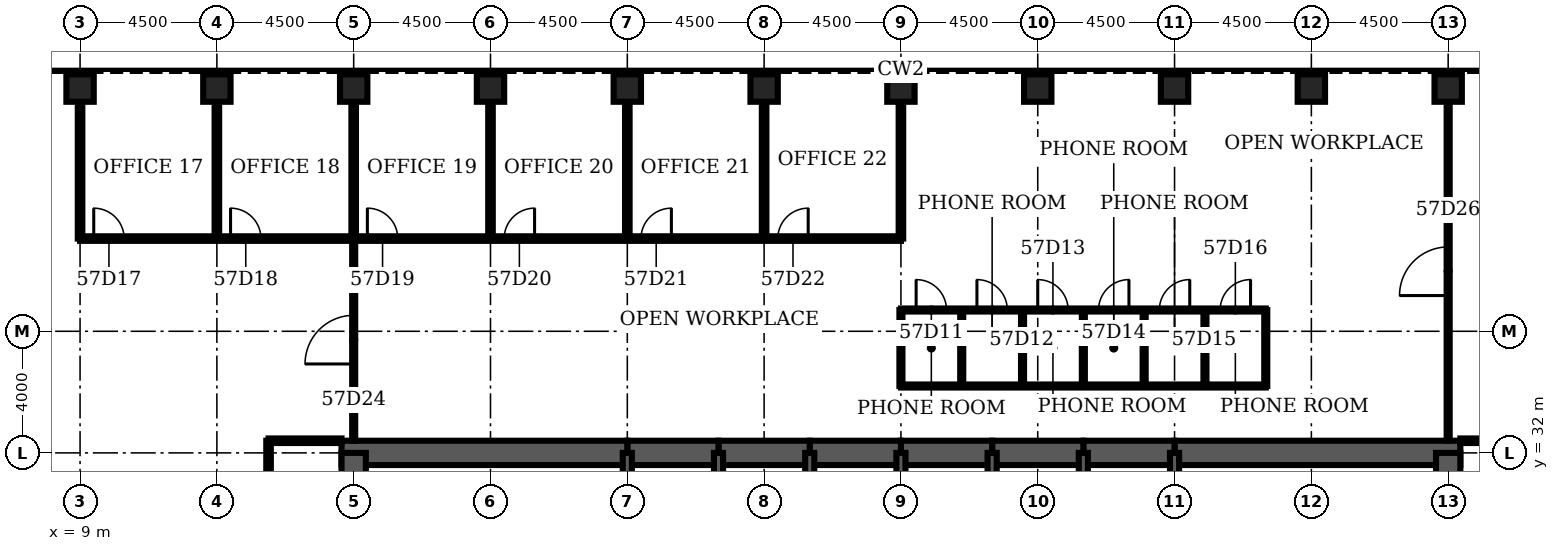
"""IFC4 building model, lengths in metres.
Left out: names, types, materials, properties, quantities, classifications, styles, units other than length and angle.
Written with IfcOpenShell. Run it as: python <this file> out.ifc"""

import sys

from ifc_helpers import new_model, si_unit, direction, frame, frame_2d, origin, origin_2d, place, context, subcontext, project, spatial, rectangle, hollow_rectangle, extrude, element, fill, save


model = new_model("IFC4")
c1 = context("Model", 3, precision=1e-05, world=origin(), true_north=direction((0.0, 1.0)))
c2 = subcontext(c1, "Body", "Model", "MODEL_VIEW")
j1 = project(units=[si_unit("LENGTHUNIT", "METRE"), si_unit("PLANEANGLEUNIT", "RADIAN")], contexts=[c1])
p1 = place(None, origin())
s1 = spatial("IfcSite", under=j1, at=p1, CompositionType="ELEMENT")
p2 = place(p1, origin())
s2 = spatial("IfcBuilding", under=s1, at=p2, CompositionType="ELEMENT")
p3 = place(p2, frame((0.0, 0.0, 253.0)))
s3 = spatial("IfcBuildingStorey", under=s2, at=p3, CompositionType="ELEMENT", Elevation=253.0)
for number, where, z_axis, x_axis in (
    (1, (54.0, 44.0, 0.0), (0.0, 0.0, 1.0), (0.0, 1.0, 0.0)),
    (2, (49.5, 44.0, 0.0), (0.0, 0.0, 1.0), (0.0, 1.0, 0.0)),
    (3, (45.0, 44.0, 0.0), (0.0, 0.0, 1.0), (0.0, 1.0, 0.0)),
    (4, (40.5, 44.0, 0.0), (0.0, 0.0, 1.0), (0.0, 1.0, 0.0)),
    (5, (36.0, 44.0, 0.0), (0.0, 0.0, 1.0), (0.0, 1.0, 0.0)),
    (6, (31.5, 44.0, 0.0), (0.0, 0.0, 1.0), (0.0, 1.0, 0.0)),
    (7, (27.0, 44.0, 0.0), (0.0, 0.0, 1.0), (0.0, 1.0, 0.0)),
    (8, (22.5, 44.0, 0.0), (0.0, 0.0, 1.0), (0.0, 1.0, 0.0)),
    (9, (18.0, 44.0, 0.0), (0.0, 0.0, 1.0), (0.0, 1.0, 0.0)),
    (10, (13.5, 44.0, 0.0), (0.0, 0.0, 1.0), (0.0, 1.0, 0.0)),
    (11, (9.0, 44.0, 0.0), (0.0, 0.0, 1.0), (0.0, 1.0, 0.0)),
):
    element("IfcColumn", number, at=place(p3, frame(where, z_axis=z_axis, x_axis=x_axis)), inside=s3, PredefinedType="COLUMN", context=c2, shape_type="SweptSolid", body=[
        extrude(hollow_rectangle(XDim=0.9, YDim=0.9, WallThickness=0.07, at=origin_2d()), origin(), (0.0, 0.0, 1.0), 4.2),
    ])
p4 = place(p3, frame((54.4, 32.0, 0.0), z_axis=(0.0, 0.0, 1.0), x_axis=(-1.0, 0.0, 0.0)))
e12 = element("IfcWall", 12, at=p4, inside=s3, PredefinedType="SHEAR", context=c2, shape_type="SweptSolid", body=[
    extrude(rectangle(XDim=9.4, YDim=0.8, at=frame_2d((4.7, 0.0))), origin(), (0.0, 0.0, 1.0), 4.2),
])
for number, where, z_axis, x_axis in (
    (13, (45.0, 32.0, 0.0), (0.0, 0.0, 1.0), (-1.0, 0.0, 0.0)),
    (14, (42.0, 32.0, 0.0), (0.0, 0.0, 1.0), (-1.0, 0.0, 0.0)),
    (15, (39.0, 32.0, 0.0), (0.0, 0.0, 1.0), (-1.0, 0.0, 0.0)),
    (16, (36.0, 32.0, 0.0), (0.0, 0.0, 1.0), (-1.0, 0.0, 0.0)),
    (17, (33.0, 32.0, 0.0), (0.0, 0.0, 1.0), (-1.0, 0.0, 0.0)),
    (18, (30.0, 32.0, 0.0), (0.0, 0.0, 1.0), (-1.0, 0.0, 0.0)),
):
    element("IfcWall", number, at=place(p3, frame(where, z_axis=z_axis, x_axis=x_axis)), inside=s3, PredefinedType="SHEAR", context=c2, shape_type="SweptSolid", body=[
        extrude(rectangle(XDim=3.0, YDim=0.8, at=frame_2d((1.5, 0.0))), origin(), (0.0, 0.0, 1.0), 4.2),
    ])
p5 = place(p3, frame((27.0, 32.0, 0.0), z_axis=(0.0, 0.0, 1.0), x_axis=(-1.0, 0.0, 0.0)))
e19 = element("IfcWall", 19, at=p5, inside=s3, PredefinedType="SHEAR", context=c2, shape_type="SweptSolid", body=[
    extrude(rectangle(XDim=9.4, YDim=0.8, at=frame_2d((4.7, 0.0))), origin(), (0.0, 0.0, 1.0), 4.2),
])
for number, where, z_axis, x_axis in (
    (20, (18.0, 32.0, 0.0), (0.0, 0.0, 1.0), (0.0, -1.0, 0.0)),
    (21, (54.0, 28.8, 0.0), (0.0, 0.0, 1.0), (0.0, 1.0, 0.0)),
):
    element("IfcWall", number, at=place(p3, frame(where, z_axis=z_axis, x_axis=x_axis)), inside=s3, PredefinedType="SHEAR", context=c2, shape_type="SweptSolid", body=[
        extrude(rectangle(XDim=3.2, YDim=0.8, at=frame_2d((1.6, 0.0))), origin(), (0.0, 0.0, 1.0), 4.2),
    ])
for number, where, z_axis, x_axis in (
    (22, (27.0, 28.8, 0.0), (0.0, 0.0, 1.0), (0.0, 1.0, 0.0)),
    (23, (30.0, 28.8, 0.0), (0.0, 0.0, 1.0), (0.0, 1.0, 0.0)),
    (24, (33.0, 28.8, 0.0), (0.0, 0.0, 1.0), (0.0, 1.0, 0.0)),
    (25, (36.0, 28.8, 0.0), (0.0, 0.0, 1.0), (0.0, 1.0, 0.0)),
    (26, (39.0, 28.8, 0.0), (0.0, 0.0, 1.0), (0.0, 1.0, 0.0)),
    (27, (42.0, 28.8, 0.0), (0.0, 0.0, 1.0), (0.0, 1.0, 0.0)),
    (28, (45.0, 28.8, 0.0), (0.0, 0.0, 1.0), (0.0, 1.0, 0.0)),
):
    element("IfcWall", number, at=place(p3, frame(where, z_axis=z_axis, x_axis=x_axis)), inside=s3, PredefinedType="SOLIDWALL", context=c2, shape_type="SweptSolid", body=[
        extrude(rectangle(XDim=3.2, YDim=0.3, at=frame_2d((1.6, 0.0))), origin(), (0.0, 0.0, 1.0), 4.2),
    ])
for number, where, z_axis, x_axis in (
    (29, (15.2, 32.4, 0.0), (0.0, 0.0, 1.0), (1.0, 0.0, 0.0)),
    (30, (54.4, 32.4, 0.0), (0.0, 0.0, 1.0), (1.0, 0.0, 0.0)),
):
    element("IfcWall", number, at=place(p3, frame(where, z_axis=z_axis, x_axis=x_axis)), inside=s3, PredefinedType="PARTITIONING", context=c2, shape_type="SweptSolid", body=[
        extrude(rectangle(XDim=2.4, YDim=0.15, at=frame_2d((1.2, 0.0))), origin(), (0.0, 0.0, 1.0), 3.0),
    ])
p6 = place(p3, frame((36.0, 34.2, 0.0), z_axis=(0.0, 0.0, 1.0), x_axis=(1.0, 0.0, 0.0)))
e31 = element("IfcWall", 31, at=p6, inside=s3, PredefinedType="PARTITIONING", context=c2, shape_type="SweptSolid", body=[
    extrude(rectangle(XDim=12.0, YDim=0.1, at=frame_2d((6.0, 0.0))), origin(), (0.0, 0.0, 1.0), 3.0),
])
p7 = place(p3, frame((36.0, 36.7, 0.0), z_axis=(0.0, 0.0, 1.0), x_axis=(1.0, 0.0, 0.0)))
e32 = element("IfcWall", 32, at=p7, inside=s3, PredefinedType="PARTITIONING", context=c2, shape_type="SweptSolid", body=[
    extrude(rectangle(XDim=12.0, YDim=0.1, at=frame_2d((6.0, 0.0))), origin(), (0.0, 0.0, 1.0), 3.0),
])
p8 = place(p7, frame((0.5, 0.0, 0.0)))
e33 = element("IfcOpeningElement", 33, at=p8, cuts=e32, PredefinedType="OPENING", context=c2, shape_type="SweptSolid", body=[
    extrude(rectangle(XDim=1.0, YDim=2.1, at=frame_2d((0.5, 1.05))), frame((0.0, 0.06, 0.0), z_axis=(0.0, -1.0, 0.0), x_axis=(1.0, 0.0, 0.0)), (0.0, 0.0, 1.0), 0.12),
])
p9 = place(p7, frame((2.5, 0.0, 0.0)))
e34 = element("IfcOpeningElement", 34, at=p9, cuts=e32, PredefinedType="OPENING", context=c2, shape_type="SweptSolid", body=[
    extrude(rectangle(XDim=1.0, YDim=2.1, at=frame_2d((0.5, 1.05))), frame((0.0, 0.06, 0.0), z_axis=(0.0, -1.0, 0.0), x_axis=(1.0, 0.0, 0.0)), (0.0, 0.0, 1.0), 0.12),
])
p10 = place(p7, frame((4.5, 0.0, 0.0)))
e35 = element("IfcOpeningElement", 35, at=p10, cuts=e32, PredefinedType="OPENING", context=c2, shape_type="SweptSolid", body=[
    extrude(rectangle(XDim=1.0, YDim=2.1, at=frame_2d((0.5, 1.05))), frame((0.0, 0.06, 0.0), z_axis=(0.0, -1.0, 0.0), x_axis=(1.0, 0.0, 0.0)), (0.0, 0.0, 1.0), 0.12),
])
p11 = place(p7, frame((6.5, 0.0, 0.0)))
e36 = element("IfcOpeningElement", 36, at=p11, cuts=e32, PredefinedType="OPENING", context=c2, shape_type="SweptSolid", body=[
    extrude(rectangle(XDim=1.0, YDim=2.1, at=frame_2d((0.5, 1.05))), frame((0.0, 0.06, 0.0), z_axis=(0.0, -1.0, 0.0), x_axis=(1.0, 0.0, 0.0)), (0.0, 0.0, 1.0), 0.12),
])
p12 = place(p7, frame((8.5, 0.0, 0.0)))
e37 = element("IfcOpeningElement", 37, at=p12, cuts=e32, PredefinedType="OPENING", context=c2, shape_type="SweptSolid", body=[
    extrude(rectangle(XDim=1.0, YDim=2.1, at=frame_2d((0.5, 1.05))), frame((0.0, 0.06, 0.0), z_axis=(0.0, -1.0, 0.0), x_axis=(1.0, 0.0, 0.0)), (0.0, 0.0, 1.0), 0.12),
])
p13 = place(p7, frame((10.5, 0.0, 0.0)))
e38 = element("IfcOpeningElement", 38, at=p13, cuts=e32, PredefinedType="OPENING", context=c2, shape_type="SweptSolid", body=[
    extrude(rectangle(XDim=1.0, YDim=2.1, at=frame_2d((0.5, 1.05))), frame((0.0, 0.06, 0.0), z_axis=(0.0, -1.0, 0.0), x_axis=(1.0, 0.0, 0.0)), (0.0, 0.0, 1.0), 0.12),
])
p14 = place(p3, frame((9.0, 39.05, 0.0), z_axis=(0.0, 0.0, 1.0), x_axis=(1.0, 0.0, 0.0)))
e39 = element("IfcWall", 39, at=p14, inside=s3, PredefinedType="PARTITIONING", context=c2, shape_type="SweptSolid", body=[
    extrude(rectangle(XDim=27.0, YDim=0.15, at=frame_2d((13.5, 0.0))), origin(), (0.0, 0.0, 1.0), 3.0),
])
p15 = place(p14, frame((0.45, 0.0, 0.0)))
e40 = element("IfcOpeningElement", 40, at=p15, cuts=e39, PredefinedType="OPENING", context=c2, shape_type="SweptSolid", body=[
    extrude(rectangle(XDim=1.0, YDim=2.1, at=frame_2d((0.5, 1.05))), frame((0.0, 0.085, 0.0), z_axis=(0.0, -1.0, 0.0), x_axis=(1.0, 0.0, 0.0)), (0.0, 0.0, 1.0), 0.17),
])
p16 = place(p14, frame((4.95, 0.0, 0.0)))
e41 = element("IfcOpeningElement", 41, at=p16, cuts=e39, PredefinedType="OPENING", context=c2, shape_type="SweptSolid", body=[
    extrude(rectangle(XDim=1.0, YDim=2.1, at=frame_2d((0.5, 1.05))), frame((0.0, 0.085, 0.0), z_axis=(0.0, -1.0, 0.0), x_axis=(1.0, 0.0, 0.0)), (0.0, 0.0, 1.0), 0.17),
])
p17 = place(p14, frame((9.45, 0.0, 0.0)))
e42 = element("IfcOpeningElement", 42, at=p17, cuts=e39, PredefinedType="OPENING", context=c2, shape_type="SweptSolid", body=[
    extrude(rectangle(XDim=1.0, YDim=2.1, at=frame_2d((0.5, 1.05))), frame((0.0, 0.085, 0.0), z_axis=(0.0, -1.0, 0.0), x_axis=(1.0, 0.0, 0.0)), (0.0, 0.0, 1.0), 0.17),
])
p18 = place(p14, frame((13.95, 0.0, 0.0)))
e43 = element("IfcOpeningElement", 43, at=p18, cuts=e39, PredefinedType="OPENING", context=c2, shape_type="SweptSolid", body=[
    extrude(rectangle(XDim=1.0, YDim=2.1, at=frame_2d((0.5, 1.05))), frame((0.0, 0.085, 0.0), z_axis=(0.0, -1.0, 0.0), x_axis=(1.0, 0.0, 0.0)), (0.0, 0.0, 1.0), 0.17),
])
p19 = place(p14, frame((18.45, 0.0, 0.0)))
e44 = element("IfcOpeningElement", 44, at=p19, cuts=e39, PredefinedType="OPENING", context=c2, shape_type="SweptSolid", body=[
    extrude(rectangle(XDim=1.0, YDim=2.1, at=frame_2d((0.5, 1.05))), frame((0.0, 0.085, 0.0), z_axis=(0.0, -1.0, 0.0), x_axis=(1.0, 0.0, 0.0)), (0.0, 0.0, 1.0), 0.17),
])
p20 = place(p14, frame((22.95, 0.0, 0.0)))
e45 = element("IfcOpeningElement", 45, at=p20, cuts=e39, PredefinedType="OPENING", context=c2, shape_type="SweptSolid", body=[
    extrude(rectangle(XDim=1.0, YDim=2.1, at=frame_2d((0.5, 1.05))), frame((0.0, 0.085, 0.0), z_axis=(0.0, -1.0, 0.0), x_axis=(1.0, 0.0, 0.0)), (0.0, 0.0, 1.0), 0.17),
])
for number, where, z_axis, x_axis in (
    (46, (9.0, 39.05, 0.0), (0.0, 0.0, 1.0), (0.0, 1.0, 0.0)),
    (47, (13.5, 39.05, 0.0), (0.0, 0.0, 1.0), (0.0, 1.0, 0.0)),
):
    element("IfcWall", number, at=place(p3, frame(where, z_axis=z_axis, x_axis=x_axis)), inside=s3, PredefinedType="PARTITIONING", context=c2, shape_type="SweptSolid", body=[
        extrude(rectangle(XDim=4.5, YDim=0.15, at=frame_2d((2.25, 0.0))), origin(), (0.0, 0.0, 1.0), 3.0),
    ])
p21 = place(p3, frame((15.2, 13.8, 0.0), z_axis=(0.0, 0.0, 1.0), x_axis=(0.0, 1.0, 0.0)))
e48 = element("IfcWall", 48, at=p21, inside=s3, PredefinedType="PARTITIONING", context=c2, shape_type="SweptSolid", body=[
    extrude(rectangle(XDim=18.6, YDim=0.15, at=frame_2d((9.3, 0.0))), origin(), (0.0, 0.0, 1.0), 3.0),
])
p22 = place(p21, frame((8.7, 0.0, 0.0)))
e49 = element("IfcOpeningElement", 49, at=p22, cuts=e48, PredefinedType="OPENING", context=c2, shape_type="SweptSolid", body=[
    extrude(rectangle(XDim=1.2, YDim=2.1, at=frame_2d((0.6, 1.05))), frame((0.0, 0.085, 0.0), z_axis=(0.0, -1.0, 0.0), x_axis=(1.0, 0.0, 0.0)), (0.0, 0.0, 1.0), 0.17),
])
p23 = place(p3, frame((18.0, 32.4, 0.0), z_axis=(0.0, 0.0, 1.0), x_axis=(0.0, 1.0, 0.0)))
e50 = element("IfcWall", 50, at=p23, inside=s3, PredefinedType="PARTITIONING", context=c2, shape_type="SweptSolid", body=[
    extrude(rectangle(XDim=6.65, YDim=0.1, at=frame_2d((3.325, 0.0))), origin(), (0.0, 0.0, 1.0), 3.0),
])
p24 = place(p23, frame((2.525, 0.0, 0.0)))
e51 = element("IfcOpeningElement", 51, at=p24, cuts=e50, PredefinedType="OPENING", context=c2, shape_type="SweptSolid", body=[
    extrude(rectangle(XDim=1.6, YDim=2.1, at=frame_2d((0.8, 1.05))), frame((0.0, 0.06, 0.0), z_axis=(0.0, -1.0, 0.0), x_axis=(1.0, 0.0, 0.0)), (0.0, 0.0, 1.0), 0.12),
])
for number, where, z_axis, x_axis in (
    (52, (18.0, 39.05, 0.0), (0.0, 0.0, 1.0), (0.0, 1.0, 0.0)),
    (53, (22.5, 39.05, 0.0), (0.0, 0.0, 1.0), (0.0, 1.0, 0.0)),
    (54, (27.0, 39.05, 0.0), (0.0, 0.0, 1.0), (0.0, 1.0, 0.0)),
    (55, (31.5, 39.05, 0.0), (0.0, 0.0, 1.0), (0.0, 1.0, 0.0)),
):
    element("IfcWall", number, at=place(p3, frame(where, z_axis=z_axis, x_axis=x_axis)), inside=s3, PredefinedType="PARTITIONING", context=c2, shape_type="SweptSolid", body=[
        extrude(rectangle(XDim=4.5, YDim=0.15, at=frame_2d((2.25, 0.0))), origin(), (0.0, 0.0, 1.0), 3.0),
    ])
p25 = place(p3, frame((36.0, 34.2, 0.0), z_axis=(0.0, 0.0, 1.0), x_axis=(0.0, 1.0, 0.0)))
e56 = element("IfcWall", 56, at=p25, inside=s3, PredefinedType="PARTITIONING", context=c2, shape_type="SweptSolid", body=[
    extrude(rectangle(XDim=2.5, YDim=0.1, at=frame_2d((1.25, 0.0))), origin(), (0.0, 0.0, 1.0), 3.0),
])
p26 = place(p3, frame((36.0, 39.05, 0.0), z_axis=(0.0, 0.0, 1.0), x_axis=(0.0, 1.0, 0.0)))
e57 = element("IfcWall", 57, at=p26, inside=s3, PredefinedType="PARTITIONING", context=c2, shape_type="SweptSolid", body=[
    extrude(rectangle(XDim=4.5, YDim=0.15, at=frame_2d((2.25, 0.0))), origin(), (0.0, 0.0, 1.0), 3.0),
])
for number, where, z_axis, x_axis in (
    (58, (38.0, 34.2, 0.0), (0.0, 0.0, 1.0), (0.0, 1.0, 0.0)),
    (59, (40.0, 34.2, 0.0), (0.0, 0.0, 1.0), (0.0, 1.0, 0.0)),
    (60, (42.0, 34.2, 0.0), (0.0, 0.0, 1.0), (0.0, 1.0, 0.0)),
    (61, (44.0, 34.2, 0.0), (0.0, 0.0, 1.0), (0.0, 1.0, 0.0)),
    (62, (46.0, 34.2, 0.0), (0.0, 0.0, 1.0), (0.0, 1.0, 0.0)),
    (63, (48.0, 34.2, 0.0), (0.0, 0.0, 1.0), (0.0, 1.0, 0.0)),
):
    element("IfcWall", number, at=place(p3, frame(where, z_axis=z_axis, x_axis=x_axis)), inside=s3, PredefinedType="PARTITIONING", context=c2, shape_type="SweptSolid", body=[
        extrude(rectangle(XDim=2.5, YDim=0.1, at=frame_2d((1.25, 0.0))), origin(), (0.0, 0.0, 1.0), 3.0),
    ])
p27 = place(p3, frame((54.0, 32.4, 0.0), z_axis=(0.0, 0.0, 1.0), x_axis=(0.0, 1.0, 0.0)))
e64 = element("IfcWall", 64, at=p27, inside=s3, PredefinedType="PARTITIONING", context=c2, shape_type="SweptSolid", body=[
    extrude(rectangle(XDim=11.15, YDim=0.1, at=frame_2d((5.575, 0.0))), origin(), (0.0, 0.0, 1.0), 3.0),
])
p28 = place(p27, frame((4.775, 0.0, 0.0)))
e65 = element("IfcOpeningElement", 65, at=p28, cuts=e64, PredefinedType="OPENING", context=c2, shape_type="SweptSolid", body=[
    extrude(rectangle(XDim=1.6, YDim=2.1, at=frame_2d((0.8, 1.05))), frame((0.0, 0.06, 0.0), z_axis=(0.0, -1.0, 0.0), x_axis=(1.0, 0.0, 0.0)), (0.0, 0.0, 1.0), 0.12),
])
p29 = place(p8, origin())
e66 = element("IfcDoor", 66, at=p29, inside=s3, OperationType="SINGLE_SWING_LEFT", PredefinedType="DOOR", context=c2, shape_type="SweptSolid", body=[
    extrude(rectangle(XDim=1.0, YDim=2.1, at=frame_2d((0.5, 1.05))), frame((0.0, 0.025, 0.0), z_axis=(0.0, -1.0, 0.0), x_axis=(1.0, 0.0, 0.0)), (0.0, 0.0, 1.0), 0.05),
])
fill(e33, e66)
p30 = place(p9, origin())
e67 = element("IfcDoor", 67, at=p30, inside=s3, OperationType="SINGLE_SWING_LEFT", PredefinedType="DOOR", context=c2, shape_type="SweptSolid", body=[
    extrude(rectangle(XDim=1.0, YDim=2.1, at=frame_2d((0.5, 1.05))), frame((0.0, 0.025, 0.0), z_axis=(0.0, -1.0, 0.0), x_axis=(1.0, 0.0, 0.0)), (0.0, 0.0, 1.0), 0.05),
])
fill(e34, e67)
p31 = place(p10, origin())
e68 = element("IfcDoor", 68, at=p31, inside=s3, OperationType="SINGLE_SWING_LEFT", PredefinedType="DOOR", context=c2, shape_type="SweptSolid", body=[
    extrude(rectangle(XDim=1.0, YDim=2.1, at=frame_2d((0.5, 1.05))), frame((0.0, 0.025, 0.0), z_axis=(0.0, -1.0, 0.0), x_axis=(1.0, 0.0, 0.0)), (0.0, 0.0, 1.0), 0.05),
])
fill(e35, e68)
p32 = place(p11, origin())
e69 = element("IfcDoor", 69, at=p32, inside=s3, OperationType="SINGLE_SWING_RIGHT", PredefinedType="DOOR", context=c2, shape_type="SweptSolid", body=[
    extrude(rectangle(XDim=1.0, YDim=2.1, at=frame_2d((0.5, 1.05))), frame((0.0, 0.025, 0.0), z_axis=(0.0, -1.0, 0.0), x_axis=(1.0, 0.0, 0.0)), (0.0, 0.0, 1.0), 0.05),
])
fill(e36, e69)
p33 = place(p12, origin())
e70 = element("IfcDoor", 70, at=p33, inside=s3, OperationType="SINGLE_SWING_RIGHT", PredefinedType="DOOR", context=c2, shape_type="SweptSolid", body=[
    extrude(rectangle(XDim=1.0, YDim=2.1, at=frame_2d((0.5, 1.05))), frame((0.0, 0.025, 0.0), z_axis=(0.0, -1.0, 0.0), x_axis=(1.0, 0.0, 0.0)), (0.0, 0.0, 1.0), 0.05),
])
fill(e37, e70)
p34 = place(p13, origin())
e71 = element("IfcDoor", 71, at=p34, inside=s3, OperationType="SINGLE_SWING_RIGHT", PredefinedType="DOOR", context=c2, shape_type="SweptSolid", body=[
    extrude(rectangle(XDim=1.0, YDim=2.1, at=frame_2d((0.5, 1.05))), frame((0.0, 0.025, 0.0), z_axis=(0.0, -1.0, 0.0), x_axis=(1.0, 0.0, 0.0)), (0.0, 0.0, 1.0), 0.05),
])
fill(e38, e71)
p35 = place(p15, origin())
e72 = element("IfcDoor", 72, at=p35, inside=s3, OperationType="SINGLE_SWING_LEFT", PredefinedType="DOOR", context=c2, shape_type="SweptSolid", body=[
    extrude(rectangle(XDim=1.0, YDim=2.1, at=frame_2d((0.5, 1.05))), frame((0.0, 0.025, 0.0), z_axis=(0.0, -1.0, 0.0), x_axis=(1.0, 0.0, 0.0)), (0.0, 0.0, 1.0), 0.05),
])
fill(e40, e72)
p36 = place(p16, origin())
e73 = element("IfcDoor", 73, at=p36, inside=s3, OperationType="SINGLE_SWING_LEFT", PredefinedType="DOOR", context=c2, shape_type="SweptSolid", body=[
    extrude(rectangle(XDim=1.0, YDim=2.1, at=frame_2d((0.5, 1.05))), frame((0.0, 0.025, 0.0), z_axis=(0.0, -1.0, 0.0), x_axis=(1.0, 0.0, 0.0)), (0.0, 0.0, 1.0), 0.05),
])
fill(e41, e73)
p37 = place(p17, origin())
e74 = element("IfcDoor", 74, at=p37, inside=s3, OperationType="SINGLE_SWING_LEFT", PredefinedType="DOOR", context=c2, shape_type="SweptSolid", body=[
    extrude(rectangle(XDim=1.0, YDim=2.1, at=frame_2d((0.5, 1.05))), frame((0.0, 0.025, 0.0), z_axis=(0.0, -1.0, 0.0), x_axis=(1.0, 0.0, 0.0)), (0.0, 0.0, 1.0), 0.05),
])
fill(e42, e74)
p38 = place(p18, origin())
e75 = element("IfcDoor", 75, at=p38, inside=s3, OperationType="SINGLE_SWING_RIGHT", PredefinedType="DOOR", context=c2, shape_type="SweptSolid", body=[
    extrude(rectangle(XDim=1.0, YDim=2.1, at=frame_2d((0.5, 1.05))), frame((0.0, 0.025, 0.0), z_axis=(0.0, -1.0, 0.0), x_axis=(1.0, 0.0, 0.0)), (0.0, 0.0, 1.0), 0.05),
])
fill(e43, e75)
p39 = place(p19, origin())
e76 = element("IfcDoor", 76, at=p39, inside=s3, OperationType="SINGLE_SWING_RIGHT", PredefinedType="DOOR", context=c2, shape_type="SweptSolid", body=[
    extrude(rectangle(XDim=1.0, YDim=2.1, at=frame_2d((0.5, 1.05))), frame((0.0, 0.025, 0.0), z_axis=(0.0, -1.0, 0.0), x_axis=(1.0, 0.0, 0.0)), (0.0, 0.0, 1.0), 0.05),
])
fill(e44, e76)
p40 = place(p20, origin())
e77 = element("IfcDoor", 77, at=p40, inside=s3, OperationType="SINGLE_SWING_RIGHT", PredefinedType="DOOR", context=c2, shape_type="SweptSolid", body=[
    extrude(rectangle(XDim=1.0, YDim=2.1, at=frame_2d((0.5, 1.05))), frame((0.0, 0.025, 0.0), z_axis=(0.0, -1.0, 0.0), x_axis=(1.0, 0.0, 0.0)), (0.0, 0.0, 1.0), 0.05),
])
fill(e45, e77)
p41 = place(p24, origin())
e78 = element("IfcDoor", 78, at=p41, inside=s3, OperationType="SINGLE_SWING_LEFT", PredefinedType="DOOR", context=c2, shape_type="SweptSolid", body=[
    extrude(rectangle(XDim=1.6, YDim=2.1, at=frame_2d((0.8, 1.05))), frame((0.0, 0.025, 0.0), z_axis=(0.0, -1.0, 0.0), x_axis=(1.0, 0.0, 0.0)), (0.0, 0.0, 1.0), 0.05),
])
fill(e51, e78)
p42 = place(p28, origin())
e79 = element("IfcDoor", 79, at=p42, inside=s3, OperationType="SINGLE_SWING_LEFT", PredefinedType="DOOR", context=c2, shape_type="SweptSolid", body=[
    extrude(rectangle(XDim=1.6, YDim=2.1, at=frame_2d((0.8, 1.05))), frame((0.0, 0.025, 0.0), z_axis=(0.0, -1.0, 0.0), x_axis=(1.0, 0.0, 0.0)), (0.0, 0.0, 1.0), 0.05),
])
fill(e65, e79)
save(model, sys.argv[1])
